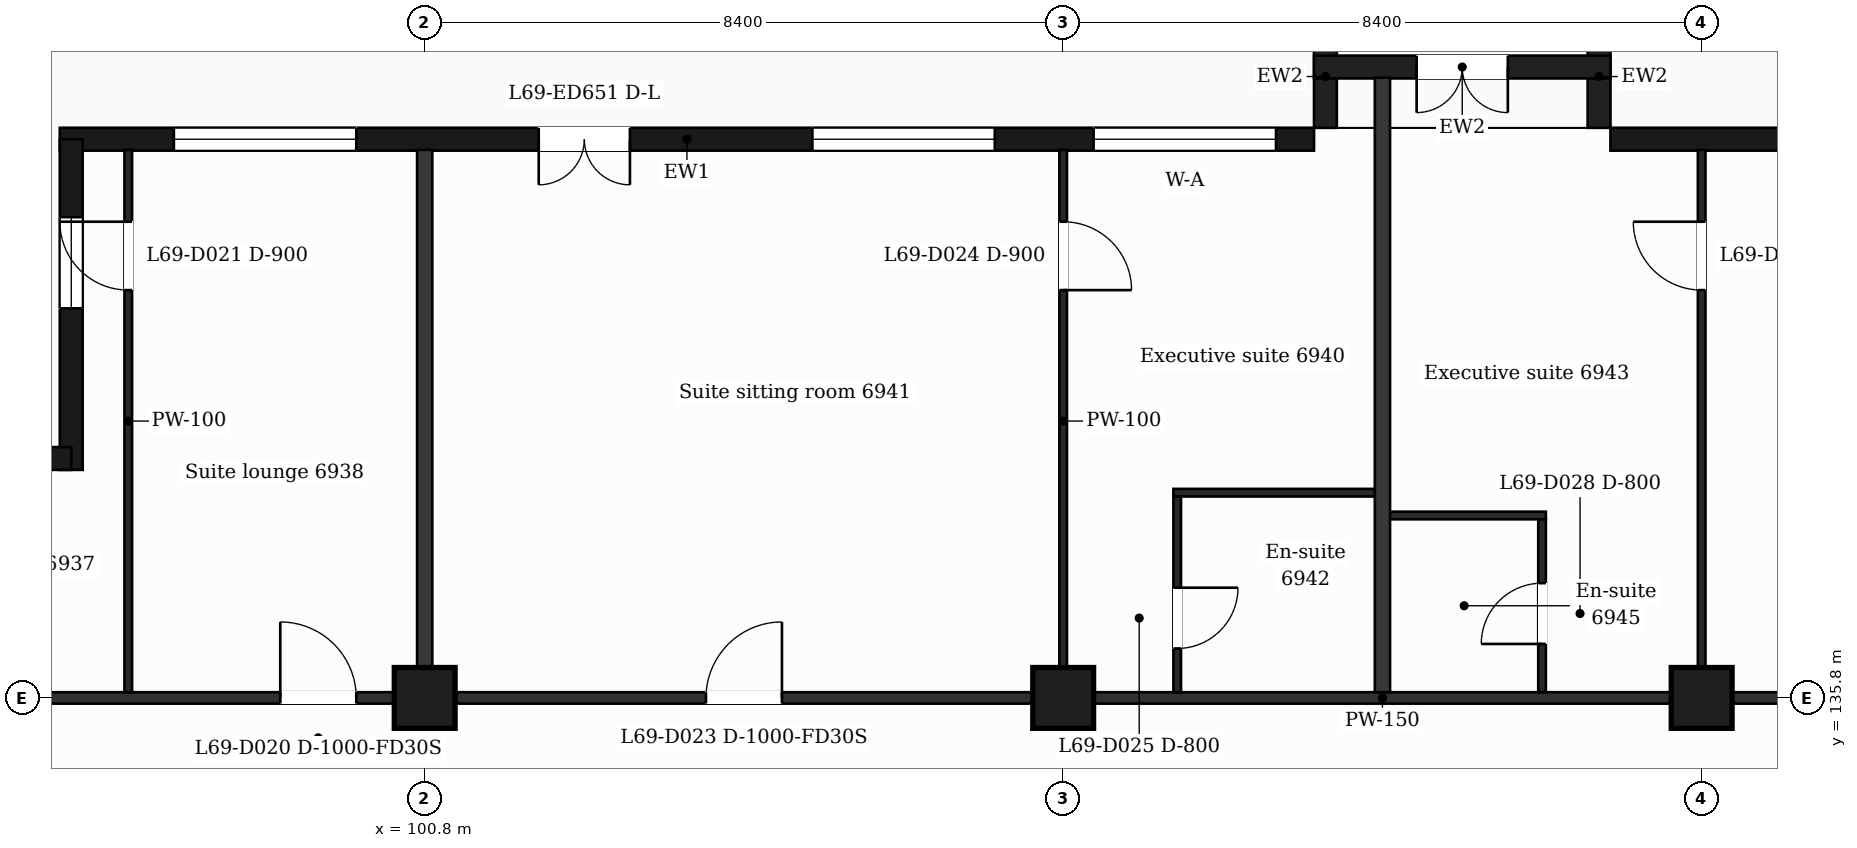
"""IFC4 building model, lengths in metres.
Left out: names, types, materials, properties, quantities, classifications, styles, units other than length and angle.
Written with IfcOpenShell. Run it as: python <this file> out.ifc"""

import sys

from ifc_helpers import new_model, si_unit, direction, frame, frame_2d, origin, origin_2d, place, context, subcontext, project, spatial, rectangle, extrude, element, fill, save


model = new_model("IFC4")
c1 = context("Model", 3, precision=1e-05, world=origin(), true_north=direction((0.0, 1.0)))
c2 = subcontext(c1, "Body", "Model", "MODEL_VIEW")
j1 = project(units=[si_unit("LENGTHUNIT", "METRE"), si_unit("PLANEANGLEUNIT", "RADIAN")], contexts=[c1])
p1 = place(None, origin())
s1 = spatial("IfcSite", under=j1, at=p1, CompositionType="ELEMENT")
p2 = place(p1, origin())
s2 = spatial("IfcBuilding", under=s1, at=p2, CompositionType="ELEMENT")
p3 = place(p2, frame((0.0, 0.0, 284.9)))
s3 = spatial("IfcBuildingStorey", under=s2, at=p3, CompositionType="ELEMENT", Elevation=284.9)
for number, where, z_axis, x_axis in (
    (1, (100.8, 135.8, 0.0), (0.0, 0.0, 1.0), (1.0, 0.0, 0.0)),
    (2, (109.2, 135.8, 0.0), (0.0, 0.0, 1.0), (1.0, 0.0, 0.0)),
    (3, (117.6, 135.8, 0.0), (0.0, 0.0, 1.0), (1.0, 0.0, 0.0)),
):
    element("IfcColumn", number, at=place(p3, frame(where, z_axis=z_axis, x_axis=x_axis)), inside=s3, PredefinedType="COLUMN", context=c2, shape_type="SweptSolid", body=[
        extrude(rectangle(XDim=0.8, YDim=0.8, at=origin_2d()), origin(), (0.0, 0.0, 1.0), 3.7),
    ])
p4 = place(p3, frame((130.65, 143.15, 0.0), z_axis=(0.0, 0.0, 1.0), x_axis=(-1.0, 0.0, 0.0)))
e4 = element("IfcWall", 4, at=p4, inside=s3, PredefinedType="SOLIDWALL", context=c2, shape_type="SweptSolid", body=[
    extrude(rectangle(XDim=14.25, YDim=0.3, at=frame_2d((7.125, 0.0))), origin(), (0.0, 0.0, 1.0), 3.38),
])
p5 = place(p4, frame((1.35, 0.0, 0.9)))
e5 = element("IfcOpeningElement", 5, at=p5, cuts=e4, PredefinedType="OPENING", context=c2, shape_type="SweptSolid", body=[
    extrude(rectangle(XDim=2.4, YDim=2.1, at=frame_2d((1.2, 1.05))), frame((0.0, 0.16, 0.0), z_axis=(0.0, -1.0, 0.0), x_axis=(1.0, 0.0, 0.0)), (0.0, 0.0, 1.0), 0.32),
])
p6 = place(p4, frame((5.25, 0.0, 0.0)))
e6 = element("IfcOpeningElement", 6, at=p6, cuts=e4, PredefinedType="OPENING", context=c2, shape_type="SweptSolid", body=[
    extrude(rectangle(XDim=1.2, YDim=2.4, at=frame_2d((0.6, 1.2))), frame((0.0, 0.16, 0.0), z_axis=(0.0, -1.0, 0.0), x_axis=(1.0, 0.0, 0.0)), (0.0, 0.0, 1.0), 0.32),
])
p7 = place(p4, frame((7.05, 0.0, 0.9)))
e7 = element("IfcOpeningElement", 7, at=p7, cuts=e4, PredefinedType="OPENING", context=c2, shape_type="SweptSolid", body=[
    extrude(rectangle(XDim=1.2, YDim=2.1, at=frame_2d((0.6, 1.05))), frame((0.0, 0.16, 0.0), z_axis=(0.0, -1.0, 0.0), x_axis=(1.0, 0.0, 0.0)), (0.0, 0.0, 1.0), 0.32),
])
p8 = place(p4, frame((10.35, 0.0, 0.9)))
e8 = element("IfcOpeningElement", 8, at=p8, cuts=e4, PredefinedType="OPENING", context=c2, shape_type="SweptSolid", body=[
    extrude(rectangle(XDim=1.2, YDim=2.1, at=frame_2d((0.6, 1.05))), frame((0.0, 0.16, 0.0), z_axis=(0.0, -1.0, 0.0), x_axis=(1.0, 0.0, 0.0)), (0.0, 0.0, 1.0), 0.32),
])
p9 = place(p3, frame((112.5, 143.15, 0.0), z_axis=(0.0, 0.0, 1.0), x_axis=(-1.0, 0.0, 0.0)))
e9 = element("IfcWall", 9, at=p9, inside=s3, PredefinedType="SOLIDWALL", context=c2, shape_type="SweptSolid", body=[
    extrude(rectangle(XDim=16.5, YDim=0.3, at=frame_2d((8.25, 0.0))), origin(), (0.0, 0.0, 1.0), 3.38),
])
p10 = place(p9, frame((0.5, 0.0, 0.9)))
e10 = element("IfcOpeningElement", 10, at=p10, cuts=e9, PredefinedType="OPENING", context=c2, shape_type="SweptSolid", body=[
    extrude(rectangle(XDim=2.4, YDim=2.1, at=frame_2d((1.2, 1.05))), frame((0.0, 0.16, 0.0), z_axis=(0.0, -1.0, 0.0), x_axis=(1.0, 0.0, 0.0)), (0.0, 0.0, 1.0), 0.32),
])
p11 = place(p9, frame((4.2, 0.0, 0.9)))
e11 = element("IfcOpeningElement", 11, at=p11, cuts=e9, PredefinedType="OPENING", context=c2, shape_type="SweptSolid", body=[
    extrude(rectangle(XDim=2.4, YDim=2.1, at=frame_2d((1.2, 1.05))), frame((0.0, 0.16, 0.0), z_axis=(0.0, -1.0, 0.0), x_axis=(1.0, 0.0, 0.0)), (0.0, 0.0, 1.0), 0.32),
])
p12 = place(p9, frame((9.0, 0.0, 0.0)))
e12 = element("IfcOpeningElement", 12, at=p12, cuts=e9, PredefinedType="OPENING", context=c2, shape_type="SweptSolid", body=[
    extrude(rectangle(XDim=1.2, YDim=2.4, at=frame_2d((0.6, 1.2))), frame((0.0, 0.16, 0.0), z_axis=(0.0, -1.0, 0.0), x_axis=(1.0, 0.0, 0.0)), (0.0, 0.0, 1.0), 0.32),
])
p13 = place(p9, frame((12.6, 0.0, 0.9)))
e13 = element("IfcOpeningElement", 13, at=p13, cuts=e9, PredefinedType="OPENING", context=c2, shape_type="SweptSolid", body=[
    extrude(rectangle(XDim=2.4, YDim=2.1, at=frame_2d((1.2, 1.05))), frame((0.0, 0.16, 0.0), z_axis=(0.0, -1.0, 0.0), x_axis=(1.0, 0.0, 0.0)), (0.0, 0.0, 1.0), 0.32),
])
for number, where, z_axis, x_axis in (
    (14, (116.25, 143.3, 0.0), (0.0, 0.0, 1.0), (0.0, 1.0, 0.0)),
    (15, (112.65, 143.3, 0.0), (0.0, 0.0, 1.0), (0.0, 1.0, 0.0)),
):
    element("IfcWall", number, at=place(p3, frame(where, z_axis=z_axis, x_axis=x_axis)), inside=s3, PredefinedType="SOLIDWALL", context=c2, shape_type="SweptSolid", body=[
        extrude(rectangle(XDim=1.35, YDim=0.3, at=frame_2d((0.675, 0.0))), origin(), (0.0, 0.0, 1.0), 3.38),
    ])
p14 = place(p3, frame((116.4, 144.1, 0.0), z_axis=(0.0, 0.0, 1.0), x_axis=(-1.0, 0.0, 0.0)))
e16 = element("IfcWall", 16, at=p14, inside=s3, PredefinedType="SOLIDWALL", context=c2, shape_type="SweptSolid", body=[
    extrude(rectangle(XDim=3.9, YDim=0.3, at=frame_2d((1.95, 0.0))), origin(), (0.0, 0.0, 1.0), 3.38),
])
p15 = place(p14, frame((1.35, 0.0, 0.0)))
e17 = element("IfcOpeningElement", 17, at=p15, cuts=e16, PredefinedType="OPENING", context=c2, shape_type="SweptSolid", body=[
    extrude(rectangle(XDim=1.2, YDim=2.4, at=frame_2d((0.6, 1.2))), frame((0.0, 0.16, 0.0), z_axis=(0.0, -1.0, 0.0), x_axis=(1.0, 0.0, 0.0)), (0.0, 0.0, 1.0), 0.32),
])
p16 = place(p3, frame((96.15, 143.15, 0.0), z_axis=(0.0, 0.0, 1.0), x_axis=(0.0, -1.0, 0.0)))
e18 = element("IfcWall", 18, at=p16, inside=s3, PredefinedType="SOLIDWALL", context=c2, shape_type="SweptSolid", body=[
    extrude(rectangle(XDim=4.35, YDim=0.3, at=frame_2d((2.175, 0.0))), origin(), (0.0, 0.0, 1.0), 3.38),
])
p17 = place(p16, frame((1.025, 0.0, 0.9)))
e19 = element("IfcOpeningElement", 19, at=p17, cuts=e18, PredefinedType="OPENING", context=c2, shape_type="SweptSolid", body=[
    extrude(rectangle(XDim=1.2, YDim=2.1, at=frame_2d((0.6, 1.05))), frame((0.0, 0.16, 0.0), z_axis=(0.0, -1.0, 0.0), x_axis=(1.0, 0.0, 0.0)), (0.0, 0.0, 1.0), 0.32),
])
p18 = place(p3, frame((96.15, 138.95, 0.0), z_axis=(0.0, 0.0, 1.0), x_axis=(-1.0, 0.0, 0.0)))
e20 = element("IfcWall", 20, at=p18, inside=s3, PredefinedType="SOLIDWALL", context=c2, shape_type="SweptSolid", body=[
    extrude(rectangle(XDim=5.104, YDim=0.3, at=frame_2d((2.552, 0.0))), origin(), (0.0, 0.0, 1.0), 3.38),
])
p19 = place(p18, frame((0.725, 0.0, 0.9)))
e21 = element("IfcOpeningElement", 21, at=p19, cuts=e20, PredefinedType="OPENING", context=c2, shape_type="SweptSolid", body=[
    extrude(rectangle(XDim=2.4, YDim=2.1, at=frame_2d((1.2, 1.05))), frame((0.0, 0.16, 0.0), z_axis=(0.0, -1.0, 0.0), x_axis=(1.0, 0.0, 0.0)), (0.0, 0.0, 1.0), 0.32),
])
p20 = place(p3, frame((90.895, 135.8, 0.0), z_axis=(0.0, 0.0, 1.0), x_axis=(1.0, 0.0, 0.0)))
e22 = element("IfcWall", 22, at=p20, inside=s3, PredefinedType="PARTITIONING", context=c2, shape_type="SweptSolid", body=[
    extrude(rectangle(XDim=45.011, YDim=0.15, at=frame_2d((22.505, 0.0))), origin(), (0.0, 0.0, 1.0), 3.38),
])
p21 = place(p20, frame((8.005, 0.0, 0.0)))
e23 = element("IfcOpeningElement", 23, at=p21, cuts=e22, PredefinedType="OPENING", context=c2, shape_type="SweptSolid", body=[
    extrude(rectangle(XDim=1.0, YDim=2.1, at=frame_2d((0.5, 1.05))), frame((0.0, 0.085, 0.0), z_axis=(0.0, -1.0, 0.0), x_axis=(1.0, 0.0, 0.0)), (0.0, 0.0, 1.0), 0.17),
])
p22 = place(p20, frame((13.605, 0.0, 0.0)))
e24 = element("IfcOpeningElement", 24, at=p22, cuts=e22, PredefinedType="OPENING", context=c2, shape_type="SweptSolid", body=[
    extrude(rectangle(XDim=1.0, YDim=2.1, at=frame_2d((0.5, 1.05))), frame((0.0, 0.085, 0.0), z_axis=(0.0, -1.0, 0.0), x_axis=(1.0, 0.0, 0.0)), (0.0, 0.0, 1.0), 0.17),
])
p23 = place(p20, frame((29.735, 0.0, 0.0)))
e25 = element("IfcOpeningElement", 25, at=p23, cuts=e22, PredefinedType="OPENING", context=c2, shape_type="SweptSolid", body=[
    extrude(rectangle(XDim=1.0, YDim=2.1, at=frame_2d((0.5, 1.05))), frame((0.0, 0.085, 0.0), z_axis=(0.0, -1.0, 0.0), x_axis=(1.0, 0.0, 0.0)), (0.0, 0.0, 1.0), 0.17),
])
p24 = place(p20, frame((37.63, 0.0, 0.0)))
e26 = element("IfcOpeningElement", 26, at=p24, cuts=e22, PredefinedType="OPENING", context=c2, shape_type="SweptSolid", body=[
    extrude(rectangle(XDim=1.0, YDim=2.1, at=frame_2d((0.5, 1.05))), frame((0.0, 0.085, 0.0), z_axis=(0.0, -1.0, 0.0), x_axis=(1.0, 0.0, 0.0)), (0.0, 0.0, 1.0), 0.17),
])
p25 = place(p3, frame((113.4, 138.2, 0.0), z_axis=(0.0, 0.0, 1.0), x_axis=(1.0, 0.0, 0.0)))
e27 = element("IfcWall", 27, at=p25, inside=s3, PredefinedType="PARTITIONING", context=c2, shape_type="SweptSolid", body=[
    extrude(rectangle(XDim=2.15, YDim=0.1, at=frame_2d((1.075, 0.0))), origin(), (0.0, 0.0, 1.0), 3.38),
])
p26 = place(p3, frame((110.65, 138.5, 0.0), z_axis=(0.0, 0.0, 1.0), x_axis=(1.0, 0.0, 0.0)))
e28 = element("IfcWall", 28, at=p26, inside=s3, PredefinedType="PARTITIONING", context=c2, shape_type="SweptSolid", body=[
    extrude(rectangle(XDim=2.75, YDim=0.1, at=frame_2d((1.375, 0.0))), origin(), (0.0, 0.0, 1.0), 3.38),
])
p27 = place(p3, frame((96.9, 135.875, 0.0), z_axis=(0.0, 0.0, 1.0), x_axis=(0.0, 1.0, 0.0)))
e29 = element("IfcWall", 29, at=p27, inside=s3, PredefinedType="PARTITIONING", context=c2, shape_type="SweptSolid", body=[
    extrude(rectangle(XDim=7.135, YDim=0.1, at=frame_2d((3.567, 0.0))), origin(), (0.0, 0.0, 1.0), 3.38),
])
p28 = place(p27, frame((5.29, 0.0, 0.0)))
e30 = element("IfcOpeningElement", 30, at=p28, cuts=e29, PredefinedType="OPENING", context=c2, shape_type="SweptSolid", body=[
    extrude(rectangle(XDim=0.9, YDim=2.1, at=frame_2d((0.45, 1.05))), frame((0.0, 0.06, 0.0), z_axis=(0.0, -1.0, 0.0), x_axis=(1.0, 0.0, 0.0)), (0.0, 0.0, 1.0), 0.12),
])
p29 = place(p3, frame((100.8, 135.875, 0.0), z_axis=(0.0, 0.0, 1.0), x_axis=(0.0, 1.0, 0.0)))
e31 = element("IfcWall", 31, at=p29, inside=s3, PredefinedType="PARTITIONING", context=c2, shape_type="SweptSolid", body=[
    extrude(rectangle(XDim=7.135, YDim=0.2, at=frame_2d((3.567, 0.0))), origin(), (0.0, 0.0, 1.0), 3.38),
])
p30 = place(p3, frame((109.2, 135.875, 0.0), z_axis=(0.0, 0.0, 1.0), x_axis=(0.0, 1.0, 0.0)))
e32 = element("IfcWall", 32, at=p30, inside=s3, PredefinedType="PARTITIONING", context=c2, shape_type="SweptSolid", body=[
    extrude(rectangle(XDim=7.135, YDim=0.1, at=frame_2d((3.567, 0.0))), origin(), (0.0, 0.0, 1.0), 3.38),
])
p31 = place(p30, frame((5.29, 0.0, 0.0)))
e33 = element("IfcOpeningElement", 33, at=p31, cuts=e32, PredefinedType="OPENING", context=c2, shape_type="SweptSolid", body=[
    extrude(rectangle(XDim=0.9, YDim=2.1, at=frame_2d((0.45, 1.05))), frame((0.0, 0.06, 0.0), z_axis=(0.0, -1.0, 0.0), x_axis=(1.0, 0.0, 0.0)), (0.0, 0.0, 1.0), 0.12),
])
p32 = place(p3, frame((110.7, 135.875, 0.0), z_axis=(0.0, 0.0, 1.0), x_axis=(0.0, 1.0, 0.0)))
e34 = element("IfcWall", 34, at=p32, inside=s3, PredefinedType="PARTITIONING", context=c2, shape_type="SweptSolid", body=[
    extrude(rectangle(XDim=2.575, YDim=0.1, at=frame_2d((1.288, 0.0))), origin(), (0.0, 0.0, 1.0), 3.38),
])
p33 = place(p32, frame((0.575, 0.0, 0.0)))
e35 = element("IfcOpeningElement", 35, at=p33, cuts=e34, PredefinedType="OPENING", context=c2, shape_type="SweptSolid", body=[
    extrude(rectangle(XDim=0.8, YDim=2.1, at=frame_2d((0.4, 1.05))), frame((0.0, 0.06, 0.0), z_axis=(0.0, -1.0, 0.0), x_axis=(1.0, 0.0, 0.0)), (0.0, 0.0, 1.0), 0.12),
])
p34 = place(p3, frame((113.4, 135.875, 0.0), z_axis=(0.0, 0.0, 1.0), x_axis=(0.0, 1.0, 0.0)))
e36 = element("IfcWall", 36, at=p34, inside=s3, PredefinedType="PARTITIONING", context=c2, shape_type="SweptSolid", body=[
    extrude(rectangle(XDim=8.085, YDim=0.2, at=frame_2d((4.042, 0.0))), origin(), (0.0, 0.0, 1.0), 3.38),
])
p35 = place(p3, frame((115.5, 135.875, 0.0), z_axis=(0.0, 0.0, 1.0), x_axis=(0.0, 1.0, 0.0)))
e37 = element("IfcWall", 37, at=p35, inside=s3, PredefinedType="PARTITIONING", context=c2, shape_type="SweptSolid", body=[
    extrude(rectangle(XDim=2.275, YDim=0.1, at=frame_2d((1.137, 0.0))), origin(), (0.0, 0.0, 1.0), 3.38),
])
p36 = place(p35, frame((0.635, 0.0, 0.0)))
e38 = element("IfcOpeningElement", 38, at=p36, cuts=e37, PredefinedType="OPENING", context=c2, shape_type="SweptSolid", body=[
    extrude(rectangle(XDim=0.8, YDim=2.1, at=frame_2d((0.4, 1.05))), frame((0.0, 0.06, 0.0), z_axis=(0.0, -1.0, 0.0), x_axis=(1.0, 0.0, 0.0)), (0.0, 0.0, 1.0), 0.12),
])
p37 = place(p3, frame((117.6, 135.875, 0.0), z_axis=(0.0, 0.0, 1.0), x_axis=(0.0, 1.0, 0.0)))
e39 = element("IfcWall", 39, at=p37, inside=s3, PredefinedType="PARTITIONING", context=c2, shape_type="SweptSolid", body=[
    extrude(rectangle(XDim=7.135, YDim=0.1, at=frame_2d((3.567, 0.0))), origin(), (0.0, 0.0, 1.0), 3.38),
])
p38 = place(p37, frame((5.29, 0.0, 0.0)))
e40 = element("IfcOpeningElement", 40, at=p38, cuts=e39, PredefinedType="OPENING", context=c2, shape_type="SweptSolid", body=[
    extrude(rectangle(XDim=0.9, YDim=2.1, at=frame_2d((0.45, 1.05))), frame((0.0, 0.06, 0.0), z_axis=(0.0, -1.0, 0.0), x_axis=(1.0, 0.0, 0.0)), (0.0, 0.0, 1.0), 0.12),
])
p39 = place(p10, origin())
e41 = element("IfcWindow", 41, at=p39, inside=s3, PartitioningType="SINGLE_PANEL", PredefinedType="WINDOW", context=c2, shape_type="SweptSolid", body=[
    extrude(rectangle(XDim=2.4, YDim=2.1, at=frame_2d((1.2, 1.05))), frame((0.0, 0.03, 0.0), z_axis=(0.0, -1.0, 0.0), x_axis=(1.0, 0.0, 0.0)), (0.0, 0.0, 1.0), 0.06),
])
fill(e10, e41)
p40 = place(p11, origin())
e42 = element("IfcWindow", 42, at=p40, inside=s3, PartitioningType="SINGLE_PANEL", PredefinedType="WINDOW", context=c2, shape_type="SweptSolid", body=[
    extrude(rectangle(XDim=2.4, YDim=2.1, at=frame_2d((1.2, 1.05))), frame((0.0, 0.03, 0.0), z_axis=(0.0, -1.0, 0.0), x_axis=(1.0, 0.0, 0.0)), (0.0, 0.0, 1.0), 0.06),
])
fill(e11, e42)
p41 = place(p12, origin())
e43 = element("IfcDoor", 43, at=p41, inside=s3, OperationType="DOUBLE_DOOR_SINGLE_SWING", PredefinedType="DOOR", context=c2, shape_type="SweptSolid", body=[
    extrude(rectangle(XDim=1.2, YDim=2.4, at=frame_2d((0.6, 1.2))), frame((0.0, 0.025, 0.0), z_axis=(0.0, -1.0, 0.0), x_axis=(1.0, 0.0, 0.0)), (0.0, 0.0, 1.0), 0.05),
])
fill(e12, e43)
p42 = place(p13, origin())
e44 = element("IfcWindow", 44, at=p42, inside=s3, PartitioningType="SINGLE_PANEL", PredefinedType="WINDOW", context=c2, shape_type="SweptSolid", body=[
    extrude(rectangle(XDim=2.4, YDim=2.1, at=frame_2d((1.2, 1.05))), frame((0.0, 0.03, 0.0), z_axis=(0.0, -1.0, 0.0), x_axis=(1.0, 0.0, 0.0)), (0.0, 0.0, 1.0), 0.06),
])
fill(e13, e44)
p43 = place(p15, origin())
e45 = element("IfcDoor", 45, at=p43, inside=s3, OperationType="DOUBLE_DOOR_SINGLE_SWING", PredefinedType="DOOR", context=c2, shape_type="SweptSolid", body=[
    extrude(rectangle(XDim=1.2, YDim=2.4, at=frame_2d((0.6, 1.2))), frame((0.0, 0.025, 0.0), z_axis=(0.0, -1.0, 0.0), x_axis=(1.0, 0.0, 0.0)), (0.0, 0.0, 1.0), 0.05),
])
fill(e17, e45)
p44 = place(p17, origin())
e46 = element("IfcWindow", 46, at=p44, inside=s3, PartitioningType="SINGLE_PANEL", PredefinedType="WINDOW", context=c2, shape_type="SweptSolid", body=[
    extrude(rectangle(XDim=1.2, YDim=2.1, at=frame_2d((0.6, 1.05))), frame((0.0, 0.03, 0.0), z_axis=(0.0, -1.0, 0.0), x_axis=(1.0, 0.0, 0.0)), (0.0, 0.0, 1.0), 0.06),
])
fill(e19, e46)
p45 = place(p21, origin())
e47 = element("IfcDoor", 47, at=p45, inside=s3, OperationType="SINGLE_SWING_LEFT", PredefinedType="DOOR", context=c2, shape_type="SweptSolid", body=[
    extrude(rectangle(XDim=1.0, YDim=2.1, at=frame_2d((0.5, 1.05))), frame((0.0, 0.025, 0.0), z_axis=(0.0, -1.0, 0.0), x_axis=(1.0, 0.0, 0.0)), (0.0, 0.0, 1.0), 0.05),
])
fill(e23, e47)
p46 = place(p28, origin())
e48 = element("IfcDoor", 48, at=p46, inside=s3, OperationType="SINGLE_SWING_RIGHT", PredefinedType="DOOR", context=c2, shape_type="SweptSolid", body=[
    extrude(rectangle(XDim=0.9, YDim=2.1, at=frame_2d((0.45, 1.05))), frame((0.0, 0.025, 0.0), z_axis=(0.0, -1.0, 0.0), x_axis=(1.0, 0.0, 0.0)), (0.0, 0.0, 1.0), 0.05),
])
fill(e30, e48)
p47 = place(p22, origin())
e49 = element("IfcDoor", 49, at=p47, inside=s3, OperationType="SINGLE_SWING_RIGHT", PredefinedType="DOOR", context=c2, shape_type="SweptSolid", body=[
    extrude(rectangle(XDim=1.0, YDim=2.1, at=frame_2d((0.5, 1.05))), frame((0.0, 0.025, 0.0), z_axis=(0.0, -1.0, 0.0), x_axis=(1.0, 0.0, 0.0)), (0.0, 0.0, 1.0), 0.05),
])
fill(e24, e49)
p48 = place(p31, origin())
e50 = element("IfcDoor", 50, at=p48, inside=s3, OperationType="SINGLE_SWING_LEFT", PredefinedType="DOOR", context=c2, shape_type="SweptSolid", body=[
    extrude(rectangle(XDim=0.9, YDim=2.1, at=frame_2d((0.45, 1.05))), frame((0.0, 0.025, 0.0), z_axis=(0.0, -1.0, 0.0), x_axis=(1.0, 0.0, 0.0)), (0.0, 0.0, 1.0), 0.05),
])
fill(e33, e50)
p49 = place(p33, origin())
e51 = element("IfcDoor", 51, at=p49, inside=s3, OperationType="SINGLE_SWING_RIGHT", PredefinedType="DOOR", context=c2, shape_type="SweptSolid", body=[
    extrude(rectangle(XDim=0.8, YDim=2.1, at=frame_2d((0.4, 1.05))), frame((0.0, 0.025, 0.0), z_axis=(0.0, -1.0, 0.0), x_axis=(1.0, 0.0, 0.0)), (0.0, 0.0, 1.0), 0.05),
])
fill(e35, e51)
p50 = place(p38, origin())
e52 = element("IfcDoor", 52, at=p50, inside=s3, OperationType="SINGLE_SWING_RIGHT", PredefinedType="DOOR", context=c2, shape_type="SweptSolid", body=[
    extrude(rectangle(XDim=0.9, YDim=2.1, at=frame_2d((0.45, 1.05))), frame((0.0, 0.025, 0.0), z_axis=(0.0, -1.0, 0.0), x_axis=(1.0, 0.0, 0.0)), (0.0, 0.0, 1.0), 0.05),
])
fill(e40, e52)
p51 = place(p36, origin())
e53 = element("IfcDoor", 53, at=p51, inside=s3, OperationType="SINGLE_SWING_LEFT", PredefinedType="DOOR", context=c2, shape_type="SweptSolid", body=[
    extrude(rectangle(XDim=0.8, YDim=2.1, at=frame_2d((0.4, 1.05))), frame((0.0, 0.025, 0.0), z_axis=(0.0, -1.0, 0.0), x_axis=(1.0, 0.0, 0.0)), (0.0, 0.0, 1.0), 0.05),
])
fill(e38, e53)
save(model, sys.argv[1])
